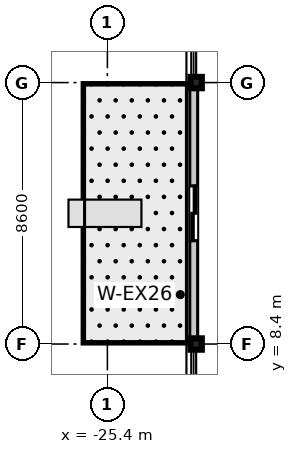
"""IFC4 building model, lengths in metres.
Left out: names, types, materials, properties, quantities, classifications, styles, units other than length and angle.
Written with IfcOpenShell. Run it as: python <this file> out.ifc"""

import sys

from ifc_helpers import new_model, si_unit, direction, frame, frame_2d, origin, origin_2d, place, context, subcontext, project, spatial, rectangle, i_section, extrude, source, transform, mapped, element, fill, save


model = new_model("IFC4")
c1 = context("Model", 3, precision=1e-05, world=origin(), true_north=direction((0.0, 1.0)))
c2 = subcontext(c1, "Body", "Model", "MODEL_VIEW")
j1 = project(units=[si_unit("LENGTHUNIT", "METRE"), si_unit("PLANEANGLEUNIT", "RADIAN")], contexts=[c1])
p1 = place(None, origin())
s1 = spatial("IfcSite", under=j1, at=p1, CompositionType="ELEMENT")
p2 = place(p1, origin())
s2 = spatial("IfcBuilding", under=s1, at=p2, CompositionType="ELEMENT")
p3 = place(p2, frame((0.0, 0.0, 319.55)))
s3 = spatial("IfcBuildingStorey", under=s2, at=p3, CompositionType="ELEMENT", Elevation=319.55)
m1 = source(origin(), c2, "Body", "SweptSolid", [
    extrude(i_section(OverallWidth=0.374, OverallDepth=0.374, WebThickness=0.014, FlangeThickness=0.023, at=origin_2d()), origin(), (0.0, 0.0, 1.0), 3.755),
])
for number, where, z_axis, x_axis in (
    (1, (-22.48, 8.4, 0.0), (0.0, 0.0, 1.0), (1.0, 0.0, 0.0)),
    (2, (-22.48, 17.0, 0.0), (0.0, 0.0, 1.0), (1.0, 0.0, 0.0)),
):
    element("IfcColumn", number, at=place(p3, frame(where, z_axis=z_axis, x_axis=x_axis)), inside=s3, PredefinedType="COLUMN", context=c2, shape_type="MappedRepresentation", body=[
        mapped(m1, transform((0.0, 0.0, 0.0), scale=1.0)),
    ])
m2 = source(origin(), c2, "Body", "SweptSolid", [
    extrude(rectangle(XDim=8.6, YDim=0.26, at=frame_2d((4.3, 0.0))), origin(), (0.0, 0.0, 1.0), 2.98),
])
p4 = place(p3, frame((-22.56, 8.4, 0.0), z_axis=(0.0, 0.0, 1.0), x_axis=(0.0, 1.0, 0.0)))
e3 = element("IfcWall", 3, at=p4, inside=s3, PredefinedType="STANDARD", context=c2, shape_type="MappedRepresentation", body=[
    mapped(m2, transform((0.0, 0.0, 0.0), scale=1.0)),
])
p5 = place(p4, frame((3.4, 0.0, 0.0)))
e4 = element("IfcOpeningElement", 4, at=p5, cuts=e3, PredefinedType="OPENING", context=c2, shape_type="SweptSolid", body=[
    extrude(rectangle(XDim=1.8, YDim=2.25, at=frame_2d((0.9, 1.125))), frame((0.0, 0.14, 0.0), z_axis=(0.0, -1.0, 0.0), x_axis=(1.0, 0.0, 0.0)), (0.0, 0.0, 1.0), 0.28),
])
m3 = source(origin(), c2, "Body", "SweptSolid", [
    extrude(rectangle(XDim=1.8, YDim=2.25, at=frame_2d((0.9, 1.125))), frame((0.0, 0.025, 0.0), z_axis=(0.0, -1.0, 0.0), x_axis=(1.0, 0.0, 0.0)), (0.0, 0.0, 1.0), 0.05),
])
p6 = place(p5, origin())
e5 = element("IfcDoor", 5, at=p6, inside=s3, OperationType="DOUBLE_DOOR_SLIDING", PredefinedType="DOOR", context=c2, shape_type="MappedRepresentation", body=[
    mapped(m3, transform((0.0, 0.0, 0.0), scale=1.0)),
])
fill(e4, e5)
save(model, sys.argv[1])
